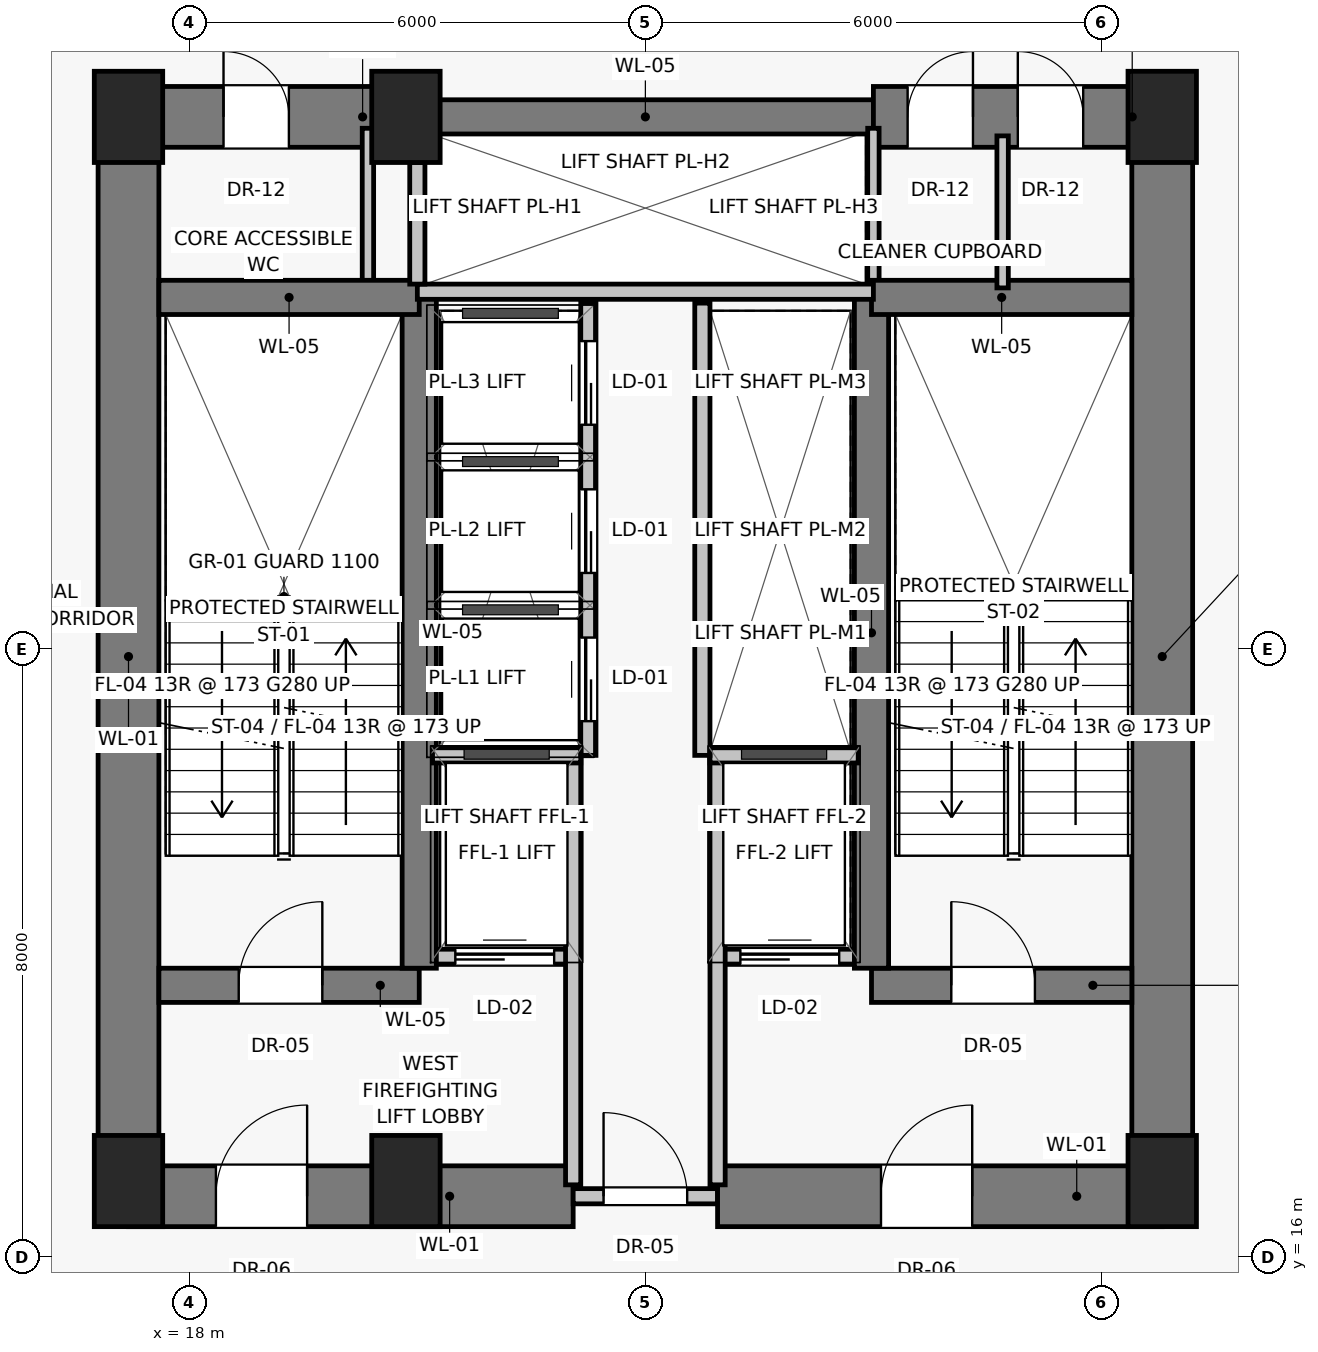
"""IFC4 building model, lengths in metres.
Left out: names, types, materials, properties, quantities, classifications, styles, units other than length and angle.
Written with IfcOpenShell. Run it as: python <this file> out.ifc"""

import sys

from ifc_helpers import new_model, si_unit, direction, frame, frame_2d, origin, origin_2d, place, context, subcontext, project, spatial, rectangle, extrude, source, transform, mapped, element, fill, save


model = new_model("IFC4")
c1 = context("Model", 3, precision=1e-05, world=origin(), true_north=direction((0.0, 1.0)))
c2 = subcontext(c1, "Body", "Model", "MODEL_VIEW")
j1 = project(units=[si_unit("LENGTHUNIT", "METRE"), si_unit("PLANEANGLEUNIT", "RADIAN")], contexts=[c1])
p1 = place(None, origin())
s1 = spatial("IfcSite", under=j1, at=p1, CompositionType="ELEMENT")
p2 = place(p1, origin())
s2 = spatial("IfcBuilding", under=s1, at=p2, CompositionType="ELEMENT")
p3 = place(p2, frame((0.0, 0.0, 22.8)))
s3 = spatial("IfcBuildingStorey", under=s2, at=p3, CompositionType="ELEMENT", Elevation=22.8)
for number, where, z_axis, x_axis in (
    (1, (17.2, 17.0, 0.0), (0.0, 0.0, 1.0), (1.0, 0.0, 0.0)),
    (2, (20.85, 17.0, 0.0), (0.0, 0.0, 1.0), (1.0, 0.0, 0.0)),
    (3, (30.8, 17.0, 0.0), (0.0, 0.0, 1.0), (1.0, 0.0, 0.0)),
    (4, (17.2, 31.0, 0.0), (0.0, 0.0, 1.0), (1.0, 0.0, 0.0)),
    (5, (20.85, 31.0, 0.0), (0.0, 0.0, 1.0), (1.0, 0.0, 0.0)),
    (6, (30.8, 31.0, 0.0), (0.0, 0.0, 1.0), (1.0, 0.0, 0.0)),
):
    element("IfcColumn", number, at=place(p3, frame(where, z_axis=z_axis, x_axis=x_axis)), inside=s3, PredefinedType="PILASTER", context=c2, shape_type="SweptSolid", body=[
        extrude(rectangle(XDim=0.9, YDim=1.2, at=origin_2d()), origin(), (0.0, 0.0, 1.0), 4.5),
    ])
for number, where, z_axis, x_axis in (
    (7, (17.2, 16.8, 0.0), (0.0, 0.0, 1.0), (0.0, 1.0, 0.0)),
    (8, (30.8, 16.8, 0.0), (0.0, 0.0, 1.0), (0.0, 1.0, 0.0)),
):
    element("IfcWall", number, at=place(p3, frame(where, z_axis=z_axis, x_axis=x_axis)), inside=s3, PredefinedType="SHEAR", context=c2, shape_type="SweptSolid", body=[
        extrude(rectangle(XDim=14.2, YDim=0.8, at=frame_2d((7.1, 0.0))), origin(), (0.0, 0.0, 1.0), 4.25),
    ])
p4 = place(p3, frame((17.2, 16.8, 0.0), z_axis=(0.0, 0.0, 1.0), x_axis=(1.0, 0.0, 0.0)))
e9 = element("IfcWall", 9, at=p4, inside=s3, PredefinedType="SHEAR", context=c2, shape_type="SweptSolid", body=[
    extrude(rectangle(XDim=5.85, YDim=0.8, at=frame_2d((2.925, 0.0))), origin(), (0.0, 0.0, 1.0), 4.25),
])
p5 = place(p4, frame((1.15, 0.0, 0.0)))
e10 = element("IfcOpeningElement", 10, at=p5, cuts=e9, PredefinedType="OPENING", context=c2, shape_type="SweptSolid", body=[
    extrude(rectangle(XDim=1.2, YDim=2.03, at=frame_2d((0.6, 1.015))), frame((0.0, 0.41, 0.0), z_axis=(0.0, -1.0, 0.0), x_axis=(1.0, 0.0, 0.0)), (0.0, 0.0, 1.0), 0.82),
])
p6 = place(p3, frame((23.05, 16.8, 0.0), z_axis=(0.0, 0.0, 1.0), x_axis=(1.0, 0.0, 0.0)))
e11 = element("IfcWall", 11, at=p6, inside=s3, PredefinedType="SOLIDWALL", context=c2, shape_type="SweptSolid", body=[
    extrude(rectangle(XDim=1.9, YDim=0.2, at=frame_2d((0.95, 0.0))), origin(), (0.0, 0.0, 1.0), 3.4),
])
p7 = place(p6, frame((0.4, 0.0, 0.0)))
e12 = element("IfcOpeningElement", 12, at=p7, cuts=e11, PredefinedType="OPENING", context=c2, shape_type="SweptSolid", body=[
    extrude(rectangle(XDim=1.1, YDim=2.03, at=frame_2d((0.55, 1.015))), frame((0.0, 0.11, 0.0), z_axis=(0.0, -1.0, 0.0), x_axis=(1.0, 0.0, 0.0)), (0.0, 0.0, 1.0), 0.22),
])
p8 = place(p3, frame((24.95, 16.8, 0.0), z_axis=(0.0, 0.0, 1.0), x_axis=(1.0, 0.0, 0.0)))
e13 = element("IfcWall", 13, at=p8, inside=s3, PredefinedType="SHEAR", context=c2, shape_type="SweptSolid", body=[
    extrude(rectangle(XDim=5.85, YDim=0.8, at=frame_2d((2.925, 0.0))), origin(), (0.0, 0.0, 1.0), 4.25),
])
p9 = place(p8, frame((2.15, 0.0, 0.0)))
e14 = element("IfcOpeningElement", 14, at=p9, cuts=e13, PredefinedType="OPENING", context=c2, shape_type="SweptSolid", body=[
    extrude(rectangle(XDim=1.2, YDim=2.03, at=frame_2d((0.6, 1.015))), frame((0.0, 0.41, 0.0), z_axis=(0.0, -1.0, 0.0), x_axis=(1.0, 0.0, 0.0)), (0.0, 0.0, 1.0), 0.82),
])
p10 = place(p3, frame((17.2, 31.0, 0.0), z_axis=(0.0, 0.0, 1.0), x_axis=(1.0, 0.0, 0.0)))
e15 = element("IfcWall", 15, at=p10, inside=s3, PredefinedType="SHEAR", context=c2, shape_type="SweptSolid", body=[
    extrude(rectangle(XDim=3.8, YDim=0.8, at=frame_2d((1.9, 0.0))), origin(), (0.0, 0.0, 1.0), 4.25),
])
p11 = place(p10, frame((1.25, 0.0, 0.0)))
e16 = element("IfcOpeningElement", 16, at=p11, cuts=e15, PredefinedType="OPENING", context=c2, shape_type="SweptSolid", body=[
    extrude(rectangle(XDim=0.86, YDim=2.01, at=frame_2d((0.43, 1.005))), frame((0.0, 0.41, 0.0), z_axis=(0.0, -1.0, 0.0), x_axis=(1.0, 0.0, 0.0)), (0.0, 0.0, 1.0), 0.82),
])
p12 = place(p3, frame((21.0, 31.0, 0.0), z_axis=(0.0, 0.0, 1.0), x_axis=(1.0, 0.0, 0.0)))
e17 = element("IfcWall", 17, at=p12, inside=s3, PredefinedType="SHEAR", context=c2, shape_type="SweptSolid", body=[
    extrude(rectangle(XDim=6.0, YDim=0.45, at=frame_2d((3.0, 0.0))), origin(), (0.0, 0.0, 1.0), 4.25),
])
p13 = place(p3, frame((27.0, 31.0, 0.0), z_axis=(0.0, 0.0, 1.0), x_axis=(1.0, 0.0, 0.0)))
e18 = element("IfcWall", 18, at=p13, inside=s3, PredefinedType="SHEAR", context=c2, shape_type="SweptSolid", body=[
    extrude(rectangle(XDim=3.8, YDim=0.8, at=frame_2d((1.9, 0.0))), origin(), (0.0, 0.0, 1.0), 4.25),
])
p14 = place(p13, frame((0.45, 0.0, 0.0)))
e19 = element("IfcOpeningElement", 19, at=p14, cuts=e18, PredefinedType="OPENING", context=c2, shape_type="SweptSolid", body=[
    extrude(rectangle(XDim=0.86, YDim=2.01, at=frame_2d((0.43, 1.005))), frame((0.0, 0.41, 0.0), z_axis=(0.0, -1.0, 0.0), x_axis=(1.0, 0.0, 0.0)), (0.0, 0.0, 1.0), 0.82),
])
p15 = place(p13, frame((1.9, 0.0, 0.0)))
e20 = element("IfcOpeningElement", 20, at=p15, cuts=e18, PredefinedType="OPENING", context=c2, shape_type="SweptSolid", body=[
    extrude(rectangle(XDim=0.86, YDim=2.01, at=frame_2d((0.43, 1.005))), frame((0.0, 0.41, 0.0), z_axis=(0.0, -1.0, 0.0), x_axis=(1.0, 0.0, 0.0)), (0.0, 0.0, 1.0), 0.82),
])
for number, where, z_axis, x_axis in (
    (21, (20.35, 28.65, 0.0), (0.0, 0.0, 1.0), (0.0, 1.0, 0.0)),
    (22, (27.0, 28.65, 0.0), (0.0, 0.0, 1.0), (0.0, 1.0, 0.0)),
):
    element("IfcWall", number, at=place(p3, frame(where, z_axis=z_axis, x_axis=x_axis)), inside=s3, PredefinedType="PARTITIONING", context=c2, shape_type="SweptSolid", body=[
        extrude(rectangle(XDim=2.2, YDim=0.15, at=frame_2d((1.1, 0.0))), origin(), (0.0, 0.0, 1.0), 4.25),
    ])
p16 = place(p3, frame((17.6, 19.575, 0.0), z_axis=(0.0, 0.0, 1.0), x_axis=(1.0, 0.0, 0.0)))
e23 = element("IfcWall", 23, at=p16, inside=s3, PredefinedType="SHEAR", context=c2, shape_type="SweptSolid", body=[
    extrude(rectangle(XDim=3.425, YDim=0.45, at=frame_2d((1.712, 0.0))), origin(), (0.0, 0.0, 1.0), 4.25),
])
p17 = place(p16, frame((1.05, 0.0, 0.0)))
e24 = element("IfcOpeningElement", 24, at=p17, cuts=e23, PredefinedType="OPENING", context=c2, shape_type="SweptSolid", body=[
    extrude(rectangle(XDim=1.1, YDim=2.03, at=frame_2d((0.55, 1.015))), frame((0.0, 0.235, 0.0), z_axis=(0.0, -1.0, 0.0), x_axis=(1.0, 0.0, 0.0)), (0.0, 0.0, 1.0), 0.47),
])
p18 = place(p3, frame((21.2, 19.95, 0.0), z_axis=(0.0, 0.0, 1.0), x_axis=(1.0, 0.0, 0.0)))
e25 = element("IfcWall", 25, at=p18, inside=s3, PredefinedType="SOLIDWALL", context=c2, shape_type="SweptSolid", body=[
    extrude(rectangle(XDim=1.85, YDim=0.2, at=frame_2d((0.925, 0.0))), origin(), (0.0, 0.0, 1.0), 4.25),
])
p19 = place(p18, frame((0.3, 0.0, 0.0)))
e26 = element("IfcOpeningElement", 26, at=p19, cuts=e25, PredefinedType="OPENING", context=c2, shape_type="SweptSolid", body=[
    extrude(rectangle(XDim=1.3, YDim=2.25, at=frame_2d((0.65, 1.125))), frame((0.0, 0.11, 0.0), z_axis=(0.0, -1.0, 0.0), x_axis=(1.0, 0.0, 0.0)), (0.0, 0.0, 1.0), 0.22),
])
p20 = place(p3, frame((24.95, 19.95, 0.0), z_axis=(0.0, 0.0, 1.0), x_axis=(1.0, 0.0, 0.0)))
e27 = element("IfcWall", 27, at=p20, inside=s3, PredefinedType="SOLIDWALL", context=c2, shape_type="SweptSolid", body=[
    extrude(rectangle(XDim=1.85, YDim=0.2, at=frame_2d((0.925, 0.0))), origin(), (0.0, 0.0, 1.0), 4.25),
])
p21 = place(p20, frame((0.3, 0.0, 0.0)))
e28 = element("IfcOpeningElement", 28, at=p21, cuts=e27, PredefinedType="OPENING", context=c2, shape_type="SweptSolid", body=[
    extrude(rectangle(XDim=1.3, YDim=2.25, at=frame_2d((0.65, 1.125))), frame((0.0, 0.11, 0.0), z_axis=(0.0, -1.0, 0.0), x_axis=(1.0, 0.0, 0.0)), (0.0, 0.0, 1.0), 0.22),
])
p22 = place(p3, frame((26.975, 19.575, 0.0), z_axis=(0.0, 0.0, 1.0), x_axis=(1.0, 0.0, 0.0)))
e29 = element("IfcWall", 29, at=p22, inside=s3, PredefinedType="SHEAR", context=c2, shape_type="SweptSolid", body=[
    extrude(rectangle(XDim=3.425, YDim=0.45, at=frame_2d((1.712, 0.0))), origin(), (0.0, 0.0, 1.0), 4.25),
])
p23 = place(p22, frame((1.05, 0.0, 0.0)))
e30 = element("IfcOpeningElement", 30, at=p23, cuts=e29, PredefinedType="OPENING", context=c2, shape_type="SweptSolid", body=[
    extrude(rectangle(XDim=1.1, YDim=2.03, at=frame_2d((0.55, 1.015))), frame((0.0, 0.235, 0.0), z_axis=(0.0, -1.0, 0.0), x_axis=(1.0, 0.0, 0.0)), (0.0, 0.0, 1.0), 0.47),
])
for number, where, z_axis, x_axis in (
    (31, (21.025, 19.8, 0.0), (0.0, 0.0, 1.0), (0.0, 1.0, 0.0)),
    (32, (26.975, 19.8, 0.0), (0.0, 0.0, 1.0), (0.0, 1.0, 0.0)),
):
    element("IfcWall", number, at=place(p3, frame(where, z_axis=z_axis, x_axis=x_axis)), inside=s3, PredefinedType="SHEAR", context=c2, shape_type="SweptSolid", body=[
        extrude(rectangle(XDim=8.825, YDim=0.45, at=frame_2d((4.413, 0.0))), origin(), (0.0, 0.0, 1.0), 4.25),
    ])
for number, where, z_axis, x_axis in (
    (33, (17.6, 28.625, 0.0), (0.0, 0.0, 1.0), (1.0, 0.0, 0.0)),
    (34, (26.975, 28.625, 0.0), (0.0, 0.0, 1.0), (1.0, 0.0, 0.0)),
):
    element("IfcWall", number, at=place(p3, frame(where, z_axis=z_axis, x_axis=x_axis)), inside=s3, PredefinedType="SHEAR", context=c2, shape_type="SweptSolid", body=[
        extrude(rectangle(XDim=3.425, YDim=0.45, at=frame_2d((1.712, 0.0))), origin(), (0.0, 0.0, 1.0), 4.25),
    ])
for number, where, z_axis, x_axis in (
    (35, (23.05, 16.95, 0.0), (0.0, 0.0, 1.0), (0.0, 1.0, 0.0)),
    (36, (24.95, 16.95, 0.0), (0.0, 0.0, 1.0), (0.0, 1.0, 0.0)),
):
    element("IfcWall", number, at=place(p3, frame(where, z_axis=z_axis, x_axis=x_axis)), inside=s3, PredefinedType="SOLIDWALL", context=c2, shape_type="SweptSolid", body=[
        extrude(rectangle(XDim=5.6, YDim=0.2, at=frame_2d((2.8, 0.0))), origin(), (0.0, 0.0, 1.0), 4.25),
    ])
for number, where, z_axis, x_axis in (
    (37, (21.2, 22.6, 0.0), (0.0, 0.0, 1.0), (1.0, 0.0, 0.0)),
    (38, (24.85, 22.6, 0.0), (0.0, 0.0, 1.0), (1.0, 0.0, 0.0)),
):
    element("IfcWall", number, at=place(p3, frame(where, z_axis=z_axis, x_axis=x_axis)), inside=s3, PredefinedType="SOLIDWALL", context=c2, shape_type="SweptSolid", body=[
        extrude(rectangle(XDim=1.95, YDim=0.2, at=frame_2d((0.975, 0.0))), origin(), (0.0, 0.0, 1.0), 4.25),
    ])
p24 = place(p3, frame((21.0, 28.7, 0.0), z_axis=(0.0, 0.0, 1.0), x_axis=(1.0, 0.0, 0.0)))
e39 = element("IfcWall", 39, at=p24, inside=s3, PredefinedType="SOLIDWALL", context=c2, shape_type="SweptSolid", body=[
    extrude(rectangle(XDim=6.0, YDim=0.2, at=frame_2d((3.0, 0.0))), origin(), (0.0, 0.0, 1.0), 4.25),
])
p25 = place(p3, frame((21.0, 28.8, 0.0), z_axis=(0.0, 0.0, 1.0), x_axis=(0.0, 1.0, 0.0)))
e40 = element("IfcWall", 40, at=p25, inside=s3, PredefinedType="SOLIDWALL", context=c2, shape_type="SweptSolid", body=[
    extrude(rectangle(XDim=1.6, YDim=0.2, at=frame_2d((0.8, 0.0))), origin(), (0.0, 0.0, 1.0), 4.25),
])
p26 = place(p3, frame((23.25, 22.6, 0.0), z_axis=(0.0, 0.0, 1.0), x_axis=(0.0, 1.0, 0.0)))
e41 = element("IfcWall", 41, at=p26, inside=s3, PredefinedType="SOLIDWALL", context=c2, shape_type="SweptSolid", body=[
    extrude(rectangle(XDim=5.95, YDim=0.2, at=frame_2d((2.975, 0.0))), origin(), (0.0, 0.0, 1.0), 4.25),
])
p27 = place(p26, frame((0.45, 0.0, 0.0)))
e42 = element("IfcOpeningElement", 42, at=p27, cuts=e41, PredefinedType="OPENING", context=c2, shape_type="SweptSolid", body=[
    extrude(rectangle(XDim=1.1, YDim=2.08, at=frame_2d((0.55, 1.04))), frame((0.0, 0.11, 0.0), z_axis=(0.0, -1.0, 0.0), x_axis=(1.0, 0.0, 0.0)), (0.0, 0.0, 1.0), 0.22),
])
p28 = place(p26, frame((2.4, 0.0, 0.0)))
e43 = element("IfcOpeningElement", 43, at=p28, cuts=e41, PredefinedType="OPENING", context=c2, shape_type="SweptSolid", body=[
    extrude(rectangle(XDim=1.1, YDim=2.08, at=frame_2d((0.55, 1.04))), frame((0.0, 0.11, 0.0), z_axis=(0.0, -1.0, 0.0), x_axis=(1.0, 0.0, 0.0)), (0.0, 0.0, 1.0), 0.22),
])
p29 = place(p26, frame((4.35, 0.0, 0.0)))
e44 = element("IfcOpeningElement", 44, at=p29, cuts=e41, PredefinedType="OPENING", context=c2, shape_type="SweptSolid", body=[
    extrude(rectangle(XDim=1.1, YDim=2.08, at=frame_2d((0.55, 1.04))), frame((0.0, 0.11, 0.0), z_axis=(0.0, -1.0, 0.0), x_axis=(1.0, 0.0, 0.0)), (0.0, 0.0, 1.0), 0.22),
])
p30 = place(p3, frame((24.75, 22.6, 0.0), z_axis=(0.0, 0.0, 1.0), x_axis=(0.0, 1.0, 0.0)))
e45 = element("IfcWall", 45, at=p30, inside=s3, PredefinedType="SOLIDWALL", context=c2, shape_type="SweptSolid", body=[
    extrude(rectangle(XDim=5.95, YDim=0.2, at=frame_2d((2.975, 0.0))), origin(), (0.0, 0.0, 1.0), 4.25),
])
p31 = place(p3, frame((28.7, 28.75, 0.0), z_axis=(0.0, 0.0, 1.0), x_axis=(0.0, 1.0, 0.0)))
e46 = element("IfcWall", 46, at=p31, inside=s3, PredefinedType="PARTITIONING", context=c2, shape_type="SweptSolid", body=[
    extrude(rectangle(XDim=2.0, YDim=0.15, at=frame_2d((1.0, 0.0))), origin(), (0.0, 0.0, 1.0), 4.25),
])
m1 = source(origin(), c2, "Body", "SweptSolid", [
    extrude(rectangle(XDim=1.2, YDim=2.03, at=frame_2d((0.6, 1.015))), frame((0.0, 0.025, 0.0), z_axis=(0.0, -1.0, 0.0), x_axis=(1.0, 0.0, 0.0)), (0.0, 0.0, 1.0), 0.05),
])
p32 = place(p5, origin())
e47 = element("IfcDoor", 47, at=p32, inside=s3, OperationType="SINGLE_SWING_RIGHT", PredefinedType="DOOR", context=c2, shape_type="MappedRepresentation", body=[
    mapped(m1, transform((0.0, 0.0, 0.0), scale=1.0)),
])
fill(e10, e47)
m2 = source(origin(), c2, "Body", "SweptSolid", [
    extrude(rectangle(XDim=1.1, YDim=2.03, at=frame_2d((0.55, 1.015))), frame((0.0, 0.025, 0.0), z_axis=(0.0, -1.0, 0.0), x_axis=(1.0, 0.0, 0.0)), (0.0, 0.0, 1.0), 0.05),
])
p33 = place(p7, origin())
e48 = element("IfcDoor", 48, at=p33, inside=s3, OperationType="SINGLE_SWING_LEFT", PredefinedType="DOOR", context=c2, shape_type="MappedRepresentation", body=[
    mapped(m2, transform((0.0, 0.0, 0.0), scale=1.0)),
])
fill(e12, e48)
p34 = place(p9, origin())
e49 = element("IfcDoor", 49, at=p34, inside=s3, OperationType="SINGLE_SWING_RIGHT", PredefinedType="DOOR", context=c2, shape_type="MappedRepresentation", body=[
    mapped(m1, transform((0.0, 0.0, 0.0), scale=1.0)),
])
fill(e14, e49)
m3 = source(origin(), c2, "Body", "SweptSolid", [
    extrude(rectangle(XDim=0.86, YDim=2.01, at=frame_2d((0.43, 1.005))), frame((0.0, 0.025, 0.0), z_axis=(0.0, -1.0, 0.0), x_axis=(1.0, 0.0, 0.0)), (0.0, 0.0, 1.0), 0.05),
])
p35 = place(p11, origin())
e50 = element("IfcDoor", 50, at=p35, inside=s3, OperationType="SINGLE_SWING_LEFT", PredefinedType="DOOR", context=c2, shape_type="MappedRepresentation", body=[
    mapped(m3, transform((0.0, 0.0, 0.0), scale=1.0)),
])
fill(e16, e50)
p36 = place(p14, origin())
e51 = element("IfcDoor", 51, at=p36, inside=s3, OperationType="SINGLE_SWING_RIGHT", PredefinedType="DOOR", context=c2, shape_type="MappedRepresentation", body=[
    mapped(m3, transform((0.0, 0.0, 0.0), scale=1.0)),
])
fill(e19, e51)
p37 = place(p15, origin())
e52 = element("IfcDoor", 52, at=p37, inside=s3, OperationType="SINGLE_SWING_LEFT", PredefinedType="DOOR", context=c2, shape_type="MappedRepresentation", body=[
    mapped(m3, transform((0.0, 0.0, 0.0), scale=1.0)),
])
fill(e20, e52)
p38 = place(p17, origin())
e53 = element("IfcDoor", 53, at=p38, inside=s3, OperationType="SINGLE_SWING_RIGHT", PredefinedType="DOOR", context=c2, shape_type="MappedRepresentation", body=[
    mapped(m2, transform((0.0, 0.0, 0.0), scale=1.0)),
])
fill(e24, e53)
m4 = source(origin(), c2, "Body", "SweptSolid", [
    extrude(rectangle(XDim=1.3, YDim=2.25, at=frame_2d((0.65, 1.125))), frame((0.0, 0.025, 0.0), z_axis=(0.0, -1.0, 0.0), x_axis=(1.0, 0.0, 0.0)), (0.0, 0.0, 1.0), 0.05),
])
p39 = place(p19, origin())
e54 = element("IfcDoor", 54, at=p39, inside=s3, OperationType="SLIDING_TO_LEFT", PredefinedType="DOOR", context=c2, shape_type="MappedRepresentation", body=[
    mapped(m4, transform((0.0, 0.0, 0.0), scale=1.0)),
])
fill(e26, e54)
p40 = place(p21, origin())
e55 = element("IfcDoor", 55, at=p40, inside=s3, OperationType="SLIDING_TO_LEFT", PredefinedType="DOOR", context=c2, shape_type="MappedRepresentation", body=[
    mapped(m4, transform((0.0, 0.0, 0.0), scale=1.0)),
])
fill(e28, e55)
p41 = place(p23, origin())
e56 = element("IfcDoor", 56, at=p41, inside=s3, OperationType="SINGLE_SWING_LEFT", PredefinedType="DOOR", context=c2, shape_type="MappedRepresentation", body=[
    mapped(m2, transform((0.0, 0.0, 0.0), scale=1.0)),
])
fill(e30, e56)
m5 = source(origin(), c2, "Body", "SweptSolid", [
    extrude(rectangle(XDim=1.1, YDim=2.08, at=frame_2d((0.55, 1.04))), frame((0.0, 0.025, 0.0), z_axis=(0.0, -1.0, 0.0), x_axis=(1.0, 0.0, 0.0)), (0.0, 0.0, 1.0), 0.05),
])
p42 = place(p27, origin())
e57 = element("IfcDoor", 57, at=p42, inside=s3, OperationType="SLIDING_TO_LEFT", PredefinedType="DOOR", context=c2, shape_type="MappedRepresentation", body=[
    mapped(m5, transform((0.0, 0.0, 0.0), scale=1.0)),
])
fill(e42, e57)
p43 = place(p28, origin())
e58 = element("IfcDoor", 58, at=p43, inside=s3, OperationType="SLIDING_TO_LEFT", PredefinedType="DOOR", context=c2, shape_type="MappedRepresentation", body=[
    mapped(m5, transform((0.0, 0.0, 0.0), scale=1.0)),
])
fill(e43, e58)
p44 = place(p29, origin())
e59 = element("IfcDoor", 59, at=p44, inside=s3, OperationType="SLIDING_TO_LEFT", PredefinedType="DOOR", context=c2, shape_type="MappedRepresentation", body=[
    mapped(m5, transform((0.0, 0.0, 0.0), scale=1.0)),
])
fill(e44, e59)
save(model, sys.argv[1])
